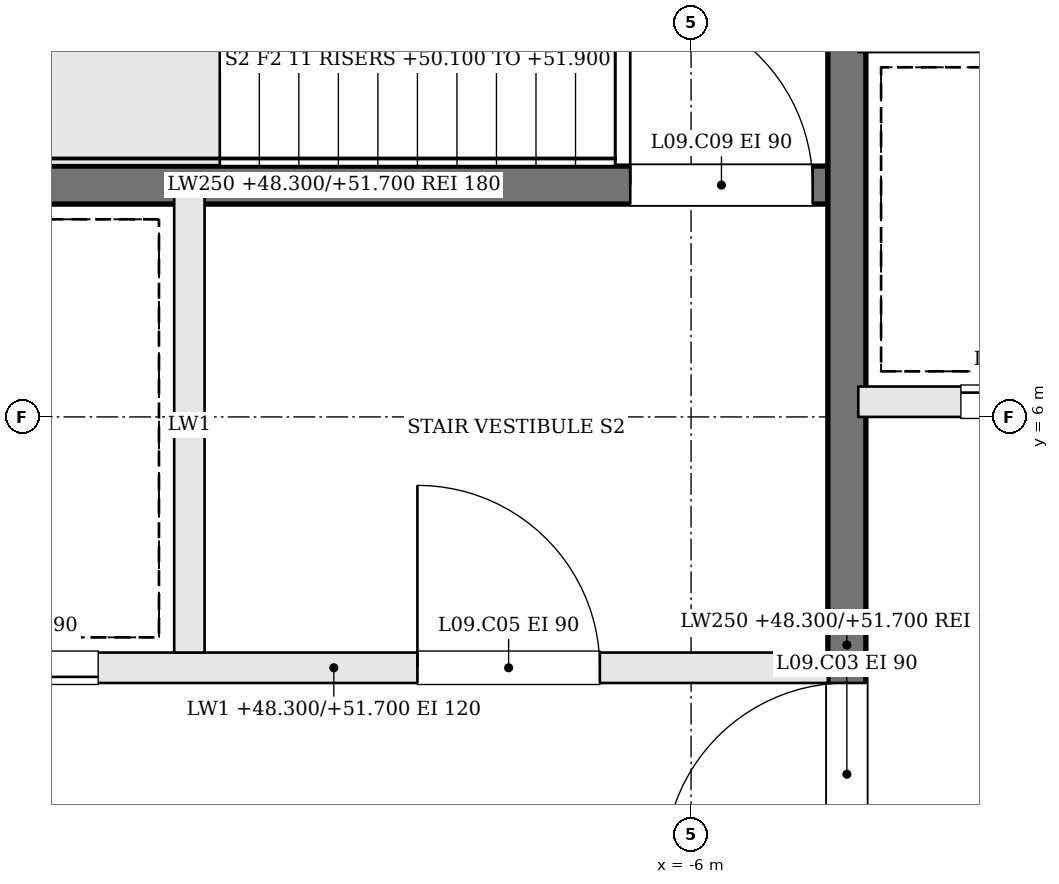
"""IFC4 building model, lengths in metres.
Left out: names, types, materials, properties, quantities, classifications, styles, units other than length and angle.
Written with IfcOpenShell. Run it as: python <this file> out.ifc"""

import sys

from ifc_helpers import new_model, si_unit, direction, frame, frame_2d, origin, place, context, subcontext, project, spatial, rectangle, extrude, element, fill, save


model = new_model("IFC4")
c1 = context("Model", 3, precision=1e-05, world=origin(), true_north=direction((0.0, 1.0)))
c2 = subcontext(c1, "Body", "Model", "MODEL_VIEW")
j1 = project(units=[si_unit("LENGTHUNIT", "METRE"), si_unit("PLANEANGLEUNIT", "RADIAN")], contexts=[c1])
p1 = place(None, origin())
s1 = spatial("IfcSite", under=j1, at=p1, CompositionType="ELEMENT")
p2 = place(p1, origin())
s2 = spatial("IfcBuilding", under=s1, at=p2, CompositionType="ELEMENT")
p3 = place(p2, frame((0.0, 0.0, 48.3)))
s3 = spatial("IfcBuildingStorey", under=s2, at=p3, CompositionType="ELEMENT", Elevation=48.3)
p4 = place(p3, frame((-11.6, 4.35, 0.0), z_axis=(0.0, 0.0, 1.0), x_axis=(1.0, 0.0, 0.0)))
e1 = element("IfcWall", 1, at=p4, inside=s3, PredefinedType="SOLIDWALL", context=c2, shape_type="SweptSolid", body=[
    extrude(rectangle(XDim=6.5, YDim=0.2, at=frame_2d((3.25, 0.0))), origin(), (0.0, 0.0, 1.0), 3.4),
])
p5 = place(p4, frame((3.8, 0.0, 0.0)))
e2 = element("IfcOpeningElement", 2, at=p5, cuts=e1, PredefinedType="OPENING", context=c2, shape_type="SweptSolid", body=[
    extrude(rectangle(XDim=1.2, YDim=2.1, at=frame_2d((0.6, 1.05))), frame((0.0, 0.11, 0.0), z_axis=(0.0, -1.0, 0.0), x_axis=(1.0, 0.0, 0.0)), (0.0, 0.0, 1.0), 0.22),
])
p6 = place(p4, frame((0.5, 0.0, 0.0)))
e3 = element("IfcOpeningElement", 3, at=p6, cuts=e1, PredefinedType="OPENING", context=c2, shape_type="SweptSolid", body=[
    extrude(rectangle(XDim=1.2, YDim=2.1, at=frame_2d((0.6, 1.05))), frame((0.0, 0.11, 0.0), z_axis=(0.0, -1.0, 0.0), x_axis=(1.0, 0.0, 0.0)), (0.0, 0.0, 1.0), 0.22),
])
p7 = place(p3, frame((-11.6, 7.525, 0.0), z_axis=(0.0, 0.0, 1.0), x_axis=(1.0, 0.0, 0.0)))
e4 = element("IfcWall", 4, at=p7, inside=s3, PredefinedType="SOLIDWALL", context=c2, shape_type="SweptSolid", body=[
    extrude(rectangle(XDim=6.5, YDim=0.25, at=frame_2d((3.25, 0.0))), origin(), (0.0, 0.0, 1.0), 3.4),
])
p8 = place(p7, frame((5.2, 0.0, 0.0)))
e5 = element("IfcOpeningElement", 5, at=p8, cuts=e4, PredefinedType="OPENING", context=c2, shape_type="SweptSolid", body=[
    extrude(rectangle(XDim=1.2, YDim=2.1, at=frame_2d((0.6, 1.05))), frame((0.0, 0.135, 0.0), z_axis=(0.0, -1.0, 0.0), x_axis=(1.0, 0.0, 0.0)), (0.0, 0.0, 1.0), 0.27),
])
p9 = place(p3, frame((-9.3, 4.45, 0.0), z_axis=(0.0, 0.0, 1.0), x_axis=(0.0, 1.0, 0.0)))
e6 = element("IfcWall", 6, at=p9, inside=s3, PredefinedType="SOLIDWALL", context=c2, shape_type="SweptSolid", body=[
    extrude(rectangle(XDim=3.0, YDim=0.2, at=frame_2d((1.5, 0.0))), origin(), (0.0, 0.0, 1.0), 3.4),
])
p10 = place(p3, frame((-4.975, -1.6, 0.0), z_axis=(0.0, 0.0, 1.0), x_axis=(0.0, 1.0, 0.0)))
e7 = element("IfcWall", 7, at=p10, inside=s3, PredefinedType="SOLIDWALL", context=c2, shape_type="SweptSolid", body=[
    extrude(rectangle(XDim=12.2, YDim=0.25, at=frame_2d((6.1, 0.0))), origin(), (0.0, 0.0, 1.0), 3.4),
])
p11 = place(p10, frame((4.65, 0.0, 0.0)))
e8 = element("IfcOpeningElement", 8, at=p11, cuts=e7, PredefinedType="OPENING", context=c2, shape_type="SweptSolid", body=[
    extrude(rectangle(XDim=1.2, YDim=2.1, at=frame_2d((0.6, 1.05))), frame((0.0, 0.135, 0.0), z_axis=(0.0, -1.0, 0.0), x_axis=(1.0, 0.0, 0.0)), (0.0, 0.0, 1.0), 0.27),
])
p12 = place(p3, frame((-4.9, 6.1, 0.0), z_axis=(0.0, 0.0, 1.0), x_axis=(1.0, 0.0, 0.0)))
e9 = element("IfcWall", 9, at=p12, inside=s3, PredefinedType="SOLIDWALL", context=c2, shape_type="SweptSolid", body=[
    extrude(rectangle(XDim=9.8, YDim=0.2, at=frame_2d((4.9, 0.0))), origin(), (0.0, 0.0, 1.0), 3.4),
])
p13 = place(p12, frame((0.675, 0.0, 0.0)))
e10 = element("IfcOpeningElement", 10, at=p13, cuts=e9, PredefinedType="OPENING", context=c2, shape_type="SweptSolid", body=[
    extrude(rectangle(XDim=1.1, YDim=2.1, at=frame_2d((0.55, 1.05))), frame((0.0, 0.11, 0.0), z_axis=(0.0, -1.0, 0.0), x_axis=(1.0, 0.0, 0.0)), (0.0, 0.0, 1.0), 0.22),
])
p14 = place(p12, frame((3.125, 0.0, 0.0)))
e11 = element("IfcOpeningElement", 11, at=p14, cuts=e9, PredefinedType="OPENING", context=c2, shape_type="SweptSolid", body=[
    extrude(rectangle(XDim=1.1, YDim=2.1, at=frame_2d((0.55, 1.05))), frame((0.0, 0.11, 0.0), z_axis=(0.0, -1.0, 0.0), x_axis=(1.0, 0.0, 0.0)), (0.0, 0.0, 1.0), 0.22),
])
p15 = place(p12, frame((5.575, 0.0, 0.0)))
e12 = element("IfcOpeningElement", 12, at=p15, cuts=e9, PredefinedType="OPENING", context=c2, shape_type="SweptSolid", body=[
    extrude(rectangle(XDim=1.1, YDim=2.1, at=frame_2d((0.55, 1.05))), frame((0.0, 0.11, 0.0), z_axis=(0.0, -1.0, 0.0), x_axis=(1.0, 0.0, 0.0)), (0.0, 0.0, 1.0), 0.22),
])
p16 = place(p12, frame((8.025, 0.0, 0.0)))
e13 = element("IfcOpeningElement", 13, at=p16, cuts=e9, PredefinedType="OPENING", context=c2, shape_type="SweptSolid", body=[
    extrude(rectangle(XDim=1.1, YDim=2.1, at=frame_2d((0.55, 1.05))), frame((0.0, 0.11, 0.0), z_axis=(0.0, -1.0, 0.0), x_axis=(1.0, 0.0, 0.0)), (0.0, 0.0, 1.0), 0.22),
])
p17 = place(p11, origin())
e14 = element("IfcDoor", 14, at=p17, inside=s3, OperationType="SINGLE_SWING_LEFT", PredefinedType="DOOR", context=c2, shape_type="SweptSolid", body=[
    extrude(rectangle(XDim=1.2, YDim=2.1, at=frame_2d((0.6, 1.05))), frame((0.0, 0.025, 0.0), z_axis=(0.0, -1.0, 0.0), x_axis=(1.0, 0.0, 0.0)), (0.0, 0.0, 1.0), 0.05),
])
fill(e8, e14)
p18 = place(p5, origin())
e15 = element("IfcDoor", 15, at=p18, inside=s3, OperationType="SINGLE_SWING_LEFT", PredefinedType="DOOR", context=c2, shape_type="SweptSolid", body=[
    extrude(rectangle(XDim=1.2, YDim=2.1, at=frame_2d((0.6, 1.05))), frame((0.0, 0.025, 0.0), z_axis=(0.0, -1.0, 0.0), x_axis=(1.0, 0.0, 0.0)), (0.0, 0.0, 1.0), 0.05),
])
fill(e2, e15)
p19 = place(p8, origin())
e16 = element("IfcDoor", 16, at=p19, inside=s3, OperationType="SINGLE_SWING_LEFT", PredefinedType="DOOR", context=c2, shape_type="SweptSolid", body=[
    extrude(rectangle(XDim=1.2, YDim=2.1, at=frame_2d((0.6, 1.05))), frame((0.0, 0.025, 0.0), z_axis=(0.0, -1.0, 0.0), x_axis=(1.0, 0.0, 0.0)), (0.0, 0.0, 1.0), 0.05),
])
fill(e5, e16)
p20 = place(p6, origin())
e17 = element("IfcDoor", 17, at=p20, inside=s3, OperationType="SLIDING_TO_RIGHT", PredefinedType="DOOR", context=c2, shape_type="SweptSolid", body=[
    extrude(rectangle(XDim=1.2, YDim=2.1, at=frame_2d((0.6, 1.05))), frame((0.0, 0.025, 0.0), z_axis=(0.0, -1.0, 0.0), x_axis=(1.0, 0.0, 0.0)), (0.0, 0.0, 1.0), 0.05),
])
fill(e3, e17)
p21 = place(p13, origin())
e18 = element("IfcDoor", 18, at=p21, inside=s3, OperationType="SLIDING_TO_RIGHT", PredefinedType="DOOR", context=c2, shape_type="SweptSolid", body=[
    extrude(rectangle(XDim=1.1, YDim=2.1, at=frame_2d((0.55, 1.05))), frame((0.0, 0.025, 0.0), z_axis=(0.0, -1.0, 0.0), x_axis=(1.0, 0.0, 0.0)), (0.0, 0.0, 1.0), 0.05),
])
fill(e10, e18)
save(model, sys.argv[1])
